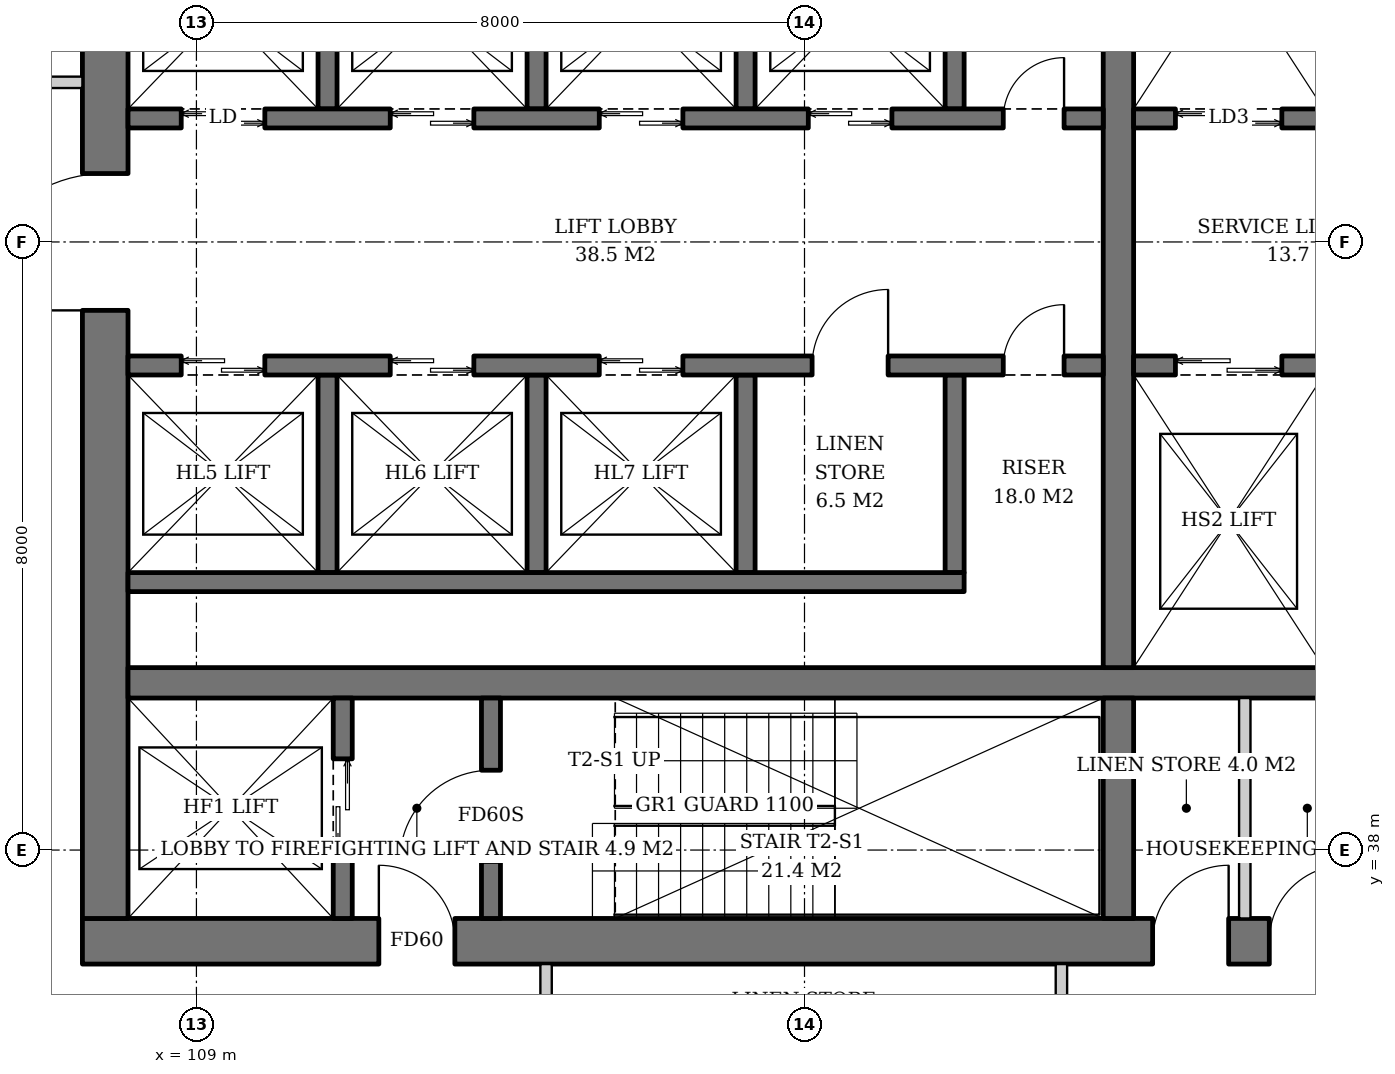
"""IFC4 building model, lengths in metres.
Left out: names, types, materials, properties, quantities, classifications, styles, units other than length and angle.
Written with IfcOpenShell. Run it as: python <this file> out.ifc"""

import sys

from ifc_helpers import new_model, si_unit, direction, frame, frame_2d, origin, place, context, subcontext, project, spatial, rectangle, extrude, element, fill, save


model = new_model("IFC4")
c1 = context("Model", 3, precision=1e-05, world=origin(), true_north=direction((0.0, 1.0)))
c2 = subcontext(c1, "Body", "Model", "MODEL_VIEW")
j1 = project(units=[si_unit("LENGTHUNIT", "METRE"), si_unit("PLANEANGLEUNIT", "RADIAN")], contexts=[c1])
p1 = place(None, origin())
s1 = spatial("IfcSite", under=j1, at=p1, CompositionType="ELEMENT")
p2 = place(p1, origin())
s2 = spatial("IfcBuilding", under=s1, at=p2, CompositionType="ELEMENT")
p3 = place(p2, frame((0.0, 0.0, 40.0)))
s3 = spatial("IfcBuildingStorey", under=s2, at=p3, CompositionType="ELEMENT", Elevation=40.0)
p4 = place(p3, frame((107.5, 36.8, 0.0), z_axis=(0.0, 0.0, 1.0), x_axis=(1.0, 0.0, 0.0)))
e1 = element("IfcWall", 1, at=p4, inside=s3, PredefinedType="SHEAR", context=c2, shape_type="SweptSolid", body=[
    extrude(rectangle(XDim=19.0, YDim=0.6, at=frame_2d((9.5, 0.0))), origin(), (0.0, 0.0, 1.0), 3.8),
])
p5 = place(p4, frame((3.9, 0.0, 0.0)))
e2 = element("IfcOpeningElement", 2, at=p5, cuts=e1, PredefinedType="OPENING", context=c2, shape_type="SweptSolid", body=[
    extrude(rectangle(XDim=1.0, YDim=2.1, at=frame_2d((0.5, 1.05))), frame((0.0, 0.31, 0.0), z_axis=(0.0, -1.0, 0.0), x_axis=(1.0, 0.0, 0.0)), (0.0, 0.0, 1.0), 0.62),
])
p6 = place(p4, frame((14.08, 0.0, 0.0)))
e3 = element("IfcOpeningElement", 3, at=p6, cuts=e1, PredefinedType="OPENING", context=c2, shape_type="SweptSolid", body=[
    extrude(rectangle(XDim=1.0, YDim=2.1, at=frame_2d((0.5, 1.05))), frame((0.0, 0.31, 0.0), z_axis=(0.0, -1.0, 0.0), x_axis=(1.0, 0.0, 0.0)), (0.0, 0.0, 1.0), 0.62),
])
p7 = place(p4, frame((15.615, 0.0, 0.0)))
e4 = element("IfcOpeningElement", 4, at=p7, cuts=e1, PredefinedType="OPENING", context=c2, shape_type="SweptSolid", body=[
    extrude(rectangle(XDim=1.0, YDim=2.1, at=frame_2d((0.5, 1.05))), frame((0.0, 0.31, 0.0), z_axis=(0.0, -1.0, 0.0), x_axis=(1.0, 0.0, 0.0)), (0.0, 0.0, 1.0), 0.62),
])
p8 = place(p4, frame((17.188, 0.0, 0.0)))
e5 = element("IfcOpeningElement", 5, at=p8, cuts=e1, PredefinedType="OPENING", context=c2, shape_type="SweptSolid", body=[
    extrude(rectangle(XDim=1.0, YDim=2.1, at=frame_2d((0.5, 1.05))), frame((0.0, 0.31, 0.0), z_axis=(0.0, -1.0, 0.0), x_axis=(1.0, 0.0, 0.0)), (0.0, 0.0, 1.0), 0.62),
])
p9 = place(p3, frame((107.8, 37.1, 0.0), z_axis=(0.0, 0.0, 1.0), x_axis=(0.0, 1.0, 0.0)))
e6 = element("IfcWall", 6, at=p9, inside=s3, PredefinedType="SHEAR", context=c2, shape_type="SweptSolid", body=[
    extrude(rectangle(XDim=17.8, YDim=0.6, at=frame_2d((8.9, 0.0))), origin(), (0.0, 0.0, 1.0), 3.8),
])
p10 = place(p9, frame((8.0, 0.0, 0.0)))
e7 = element("IfcOpeningElement", 7, at=p10, cuts=e6, PredefinedType="OPENING", context=c2, shape_type="SweptSolid", body=[
    extrude(rectangle(XDim=1.8, YDim=2.4, at=frame_2d((0.9, 1.2))), frame((0.0, 0.31, 0.0), z_axis=(0.0, -1.0, 0.0), x_axis=(1.0, 0.0, 0.0)), (0.0, 0.0, 1.0), 0.62),
])
p11 = place(p3, frame((108.1, 40.2, 0.0), z_axis=(0.0, 0.0, 1.0), x_axis=(1.0, 0.0, 0.0)))
e8 = element("IfcWall", 8, at=p11, inside=s3, PredefinedType="SHEAR", context=c2, shape_type="SweptSolid", body=[
    extrude(rectangle(XDim=17.8, YDim=0.4, at=frame_2d((8.9, 0.0))), origin(), (0.0, 0.0, 1.0), 3.8),
])
p12 = place(p3, frame((121.13, 37.1, 0.0), z_axis=(0.0, 0.0, 1.0), x_axis=(0.0, 1.0, 0.0)))
e9 = element("IfcWall", 9, at=p12, inside=s3, PredefinedType="SHEAR", context=c2, shape_type="SweptSolid", body=[
    extrude(rectangle(XDim=2.9, YDim=0.4, at=frame_2d((1.45, 0.0))), origin(), (0.0, 0.0, 1.0), 3.8),
])
p13 = place(p3, frame((121.13, 40.4, 0.0), z_axis=(0.0, 0.0, 1.0), x_axis=(0.0, 1.0, 0.0)))
e10 = element("IfcWall", 10, at=p13, inside=s3, PredefinedType="SHEAR", context=c2, shape_type="SweptSolid", body=[
    extrude(rectangle(XDim=11.2, YDim=0.4, at=frame_2d((5.6, 0.0))), origin(), (0.0, 0.0, 1.0), 3.8),
])
p14 = place(p3, frame((110.925, 37.1, 0.0), z_axis=(0.0, 0.0, 1.0), x_axis=(0.0, 1.0, 0.0)))
e11 = element("IfcWall", 11, at=p14, inside=s3, PredefinedType="SHEAR", context=c2, shape_type="SweptSolid", body=[
    extrude(rectangle(XDim=2.9, YDim=0.25, at=frame_2d((1.45, 0.0))), origin(), (0.0, 0.0, 1.0), 3.8),
])
p15 = place(p14, frame((0.8, 0.0, 0.0)))
e12 = element("IfcOpeningElement", 12, at=p15, cuts=e11, PredefinedType="OPENING", context=c2, shape_type="SweptSolid", body=[
    extrude(rectangle(XDim=1.3, YDim=2.2, at=frame_2d((0.65, 1.1))), frame((0.0, 0.135, 0.0), z_axis=(0.0, -1.0, 0.0), x_axis=(1.0, 0.0, 0.0)), (0.0, 0.0, 1.0), 0.27),
])
p16 = place(p3, frame((112.875, 37.1, 0.0), z_axis=(0.0, 0.0, 1.0), x_axis=(0.0, 1.0, 0.0)))
e13 = element("IfcWall", 13, at=p16, inside=s3, PredefinedType="SHEAR", context=c2, shape_type="SweptSolid", body=[
    extrude(rectangle(XDim=2.9, YDim=0.25, at=frame_2d((1.45, 0.0))), origin(), (0.0, 0.0, 1.0), 3.8),
])
p17 = place(p16, frame((0.75, 0.0, 0.0)))
e14 = element("IfcOpeningElement", 14, at=p17, cuts=e13, PredefinedType="OPENING", context=c2, shape_type="SweptSolid", body=[
    extrude(rectangle(XDim=1.2, YDim=2.1, at=frame_2d((0.6, 1.05))), frame((0.0, 0.135, 0.0), z_axis=(0.0, -1.0, 0.0), x_axis=(1.0, 0.0, 0.0)), (0.0, 0.0, 1.0), 0.27),
])
for number, where, z_axis, x_axis in (
    (15, (110.725, 47.75, 0.0), (0.0, 0.0, 1.0), (0.0, 1.0, 0.0)),
    (16, (113.475, 47.75, 0.0), (0.0, 0.0, 1.0), (0.0, 1.0, 0.0)),
    (17, (116.225, 47.75, 0.0), (0.0, 0.0, 1.0), (0.0, 1.0, 0.0)),
    (18, (118.975, 47.75, 0.0), (0.0, 0.0, 1.0), (0.0, 1.0, 0.0)),
):
    element("IfcWall", number, at=place(p3, frame(where, z_axis=z_axis, x_axis=x_axis)), inside=s3, PredefinedType="SHEAR", context=c2, shape_type="SweptSolid", body=[
        extrude(rectangle(XDim=2.6, YDim=0.25, at=frame_2d((1.3, 0.0))), origin(), (0.0, 0.0, 1.0), 3.8),
    ])
p18 = place(p3, frame((108.1, 47.625, 0.0), z_axis=(0.0, 0.0, 1.0), x_axis=(1.0, 0.0, 0.0)))
e19 = element("IfcWall", 19, at=p18, inside=s3, PredefinedType="SHEAR", context=c2, shape_type="SweptSolid", body=[
    extrude(rectangle(XDim=12.83, YDim=0.25, at=frame_2d((6.415, 0.0))), origin(), (0.0, 0.0, 1.0), 3.8),
])
p19 = place(p18, frame((0.7, 0.0, 0.0)))
e20 = element("IfcOpeningElement", 20, at=p19, cuts=e19, PredefinedType="OPENING", context=c2, shape_type="SweptSolid", body=[
    extrude(rectangle(XDim=1.1, YDim=2.2, at=frame_2d((0.55, 1.1))), frame((0.0, 0.135, 0.0), z_axis=(0.0, -1.0, 0.0), x_axis=(1.0, 0.0, 0.0)), (0.0, 0.0, 1.0), 0.27),
])
p20 = place(p18, frame((3.45, 0.0, 0.0)))
e21 = element("IfcOpeningElement", 21, at=p20, cuts=e19, PredefinedType="OPENING", context=c2, shape_type="SweptSolid", body=[
    extrude(rectangle(XDim=1.1, YDim=2.2, at=frame_2d((0.55, 1.1))), frame((0.0, 0.135, 0.0), z_axis=(0.0, -1.0, 0.0), x_axis=(1.0, 0.0, 0.0)), (0.0, 0.0, 1.0), 0.27),
])
p21 = place(p18, frame((6.2, 0.0, 0.0)))
e22 = element("IfcOpeningElement", 22, at=p21, cuts=e19, PredefinedType="OPENING", context=c2, shape_type="SweptSolid", body=[
    extrude(rectangle(XDim=1.1, YDim=2.2, at=frame_2d((0.55, 1.1))), frame((0.0, 0.135, 0.0), z_axis=(0.0, -1.0, 0.0), x_axis=(1.0, 0.0, 0.0)), (0.0, 0.0, 1.0), 0.27),
])
p22 = place(p18, frame((8.95, 0.0, 0.0)))
e23 = element("IfcOpeningElement", 23, at=p22, cuts=e19, PredefinedType="OPENING", context=c2, shape_type="SweptSolid", body=[
    extrude(rectangle(XDim=1.1, YDim=2.2, at=frame_2d((0.55, 1.1))), frame((0.0, 0.135, 0.0), z_axis=(0.0, -1.0, 0.0), x_axis=(1.0, 0.0, 0.0)), (0.0, 0.0, 1.0), 0.27),
])
p23 = place(p18, frame((11.515, 0.0, 0.0)))
e24 = element("IfcOpeningElement", 24, at=p23, cuts=e19, PredefinedType="OPENING", context=c2, shape_type="SweptSolid", body=[
    extrude(rectangle(XDim=0.8, YDim=2.0, at=frame_2d((0.4, 1.0))), frame((0.0, 0.135, 0.0), z_axis=(0.0, -1.0, 0.0), x_axis=(1.0, 0.0, 0.0)), (0.0, 0.0, 1.0), 0.27),
])
for number, where, z_axis, x_axis in (
    (25, (110.725, 44.25, 0.0), (0.0, 0.0, 1.0), (0.0, -1.0, 0.0)),
    (26, (113.475, 44.25, 0.0), (0.0, 0.0, 1.0), (0.0, -1.0, 0.0)),
    (27, (116.225, 44.25, 0.0), (0.0, 0.0, 1.0), (0.0, -1.0, 0.0)),
    (28, (118.975, 44.25, 0.0), (0.0, 0.0, 1.0), (0.0, -1.0, 0.0)),
):
    element("IfcWall", number, at=place(p3, frame(where, z_axis=z_axis, x_axis=x_axis)), inside=s3, PredefinedType="SHEAR", context=c2, shape_type="SweptSolid", body=[
        extrude(rectangle(XDim=2.6, YDim=0.25, at=frame_2d((1.3, 0.0))), origin(), (0.0, 0.0, 1.0), 3.8),
    ])
p24 = place(p3, frame((108.1, 41.525, 0.0), z_axis=(0.0, 0.0, 1.0), x_axis=(1.0, 0.0, 0.0)))
e29 = element("IfcWall", 29, at=p24, inside=s3, PredefinedType="SHEAR", context=c2, shape_type="SweptSolid", body=[
    extrude(rectangle(XDim=11.0, YDim=0.25, at=frame_2d((5.5, 0.0))), origin(), (0.0, 0.0, 1.0), 3.8),
])
p25 = place(p3, frame((108.1, 44.375, 0.0), z_axis=(0.0, 0.0, 1.0), x_axis=(1.0, 0.0, 0.0)))
e30 = element("IfcWall", 30, at=p25, inside=s3, PredefinedType="SHEAR", context=c2, shape_type="SweptSolid", body=[
    extrude(rectangle(XDim=12.83, YDim=0.25, at=frame_2d((6.415, 0.0))), origin(), (0.0, 0.0, 1.0), 3.8),
])
p26 = place(p25, frame((0.7, 0.0, 0.0)))
e31 = element("IfcOpeningElement", 31, at=p26, cuts=e30, PredefinedType="OPENING", context=c2, shape_type="SweptSolid", body=[
    extrude(rectangle(XDim=1.1, YDim=2.2, at=frame_2d((0.55, 1.1))), frame((0.0, 0.135, 0.0), z_axis=(0.0, -1.0, 0.0), x_axis=(1.0, 0.0, 0.0)), (0.0, 0.0, 1.0), 0.27),
])
p27 = place(p25, frame((3.45, 0.0, 0.0)))
e32 = element("IfcOpeningElement", 32, at=p27, cuts=e30, PredefinedType="OPENING", context=c2, shape_type="SweptSolid", body=[
    extrude(rectangle(XDim=1.1, YDim=2.2, at=frame_2d((0.55, 1.1))), frame((0.0, 0.135, 0.0), z_axis=(0.0, -1.0, 0.0), x_axis=(1.0, 0.0, 0.0)), (0.0, 0.0, 1.0), 0.27),
])
p28 = place(p25, frame((6.2, 0.0, 0.0)))
e33 = element("IfcOpeningElement", 33, at=p28, cuts=e30, PredefinedType="OPENING", context=c2, shape_type="SweptSolid", body=[
    extrude(rectangle(XDim=1.1, YDim=2.2, at=frame_2d((0.55, 1.1))), frame((0.0, 0.135, 0.0), z_axis=(0.0, -1.0, 0.0), x_axis=(1.0, 0.0, 0.0)), (0.0, 0.0, 1.0), 0.27),
])
p29 = place(p25, frame((9.0, 0.0, 0.0)))
e34 = element("IfcOpeningElement", 34, at=p29, cuts=e30, PredefinedType="OPENING", context=c2, shape_type="SweptSolid", body=[
    extrude(rectangle(XDim=1.0, YDim=2.1, at=frame_2d((0.5, 1.05))), frame((0.0, 0.135, 0.0), z_axis=(0.0, -1.0, 0.0), x_axis=(1.0, 0.0, 0.0)), (0.0, 0.0, 1.0), 0.27),
])
p30 = place(p25, frame((11.515, 0.0, 0.0)))
e35 = element("IfcOpeningElement", 35, at=p30, cuts=e30, PredefinedType="OPENING", context=c2, shape_type="SweptSolid", body=[
    extrude(rectangle(XDim=0.8, YDim=2.0, at=frame_2d((0.4, 1.0))), frame((0.0, 0.135, 0.0), z_axis=(0.0, -1.0, 0.0), x_axis=(1.0, 0.0, 0.0)), (0.0, 0.0, 1.0), 0.27),
])
p31 = place(p3, frame((121.33, 47.625, 0.0), z_axis=(0.0, 0.0, 1.0), x_axis=(1.0, 0.0, 0.0)))
e36 = element("IfcWall", 36, at=p31, inside=s3, PredefinedType="SHEAR", context=c2, shape_type="SweptSolid", body=[
    extrude(rectangle(XDim=4.57, YDim=0.25, at=frame_2d((2.285, 0.0))), origin(), (0.0, 0.0, 1.0), 3.8),
])
p32 = place(p31, frame((0.55, 0.0, 0.0)))
e37 = element("IfcOpeningElement", 37, at=p32, cuts=e36, PredefinedType="OPENING", context=c2, shape_type="SweptSolid", body=[
    extrude(rectangle(XDim=1.4, YDim=2.4, at=frame_2d((0.7, 1.2))), frame((0.0, 0.135, 0.0), z_axis=(0.0, -1.0, 0.0), x_axis=(1.0, 0.0, 0.0)), (0.0, 0.0, 1.0), 0.27),
])
p33 = place(p31, frame((3.26, 0.0, 0.0)))
e38 = element("IfcOpeningElement", 38, at=p33, cuts=e36, PredefinedType="OPENING", context=c2, shape_type="SweptSolid", body=[
    extrude(rectangle(XDim=0.8, YDim=2.0, at=frame_2d((0.4, 1.0))), frame((0.0, 0.135, 0.0), z_axis=(0.0, -1.0, 0.0), x_axis=(1.0, 0.0, 0.0)), (0.0, 0.0, 1.0), 0.27),
])
p34 = place(p3, frame((121.33, 44.375, 0.0), z_axis=(0.0, 0.0, 1.0), x_axis=(1.0, 0.0, 0.0)))
e39 = element("IfcWall", 39, at=p34, inside=s3, PredefinedType="SHEAR", context=c2, shape_type="SweptSolid", body=[
    extrude(rectangle(XDim=4.57, YDim=0.25, at=frame_2d((2.285, 0.0))), origin(), (0.0, 0.0, 1.0), 3.8),
])
p35 = place(p34, frame((0.55, 0.0, 0.0)))
e40 = element("IfcOpeningElement", 40, at=p35, cuts=e39, PredefinedType="OPENING", context=c2, shape_type="SweptSolid", body=[
    extrude(rectangle(XDim=1.4, YDim=2.4, at=frame_2d((0.7, 1.2))), frame((0.0, 0.135, 0.0), z_axis=(0.0, -1.0, 0.0), x_axis=(1.0, 0.0, 0.0)), (0.0, 0.0, 1.0), 0.27),
])
p36 = place(p34, frame((3.26, 0.0, 0.0)))
e41 = element("IfcOpeningElement", 41, at=p36, cuts=e39, PredefinedType="OPENING", context=c2, shape_type="SweptSolid", body=[
    extrude(rectangle(XDim=0.8, YDim=2.0, at=frame_2d((0.4, 1.0))), frame((0.0, 0.135, 0.0), z_axis=(0.0, -1.0, 0.0), x_axis=(1.0, 0.0, 0.0)), (0.0, 0.0, 1.0), 0.27),
])
p37 = place(p3, frame((122.792, 37.1, 0.0), z_axis=(0.0, 0.0, 1.0), x_axis=(0.0, 1.0, 0.0)))
e42 = element("IfcWall", 42, at=p37, inside=s3, PredefinedType="SOLIDWALL", context=c2, shape_type="SweptSolid", body=[
    extrude(rectangle(XDim=2.9, YDim=0.15, at=frame_2d((1.45, 0.0))), origin(), (0.0, 0.0, 1.0), 3.6),
])
for number, where, z_axis, x_axis in (
    (43, (107.5, 48.1, 0.0), (0.0, 0.0, 1.0), (-1.0, 0.0, 0.0)),
    (44, (113.6, 36.5, 0.0), (0.0, 0.0, 1.0), (0.0, -1.0, 0.0)),
    (45, (120.38, 36.5, 0.0), (0.0, 0.0, 1.0), (0.0, -1.0, 0.0)),
):
    element("IfcWall", number, at=place(p3, frame(where, z_axis=z_axis, x_axis=x_axis)), inside=s3, PredefinedType="PARTITIONING", context=c2, shape_type="SweptSolid", body=[
        extrude(rectangle(XDim=1.875, YDim=0.15, at=frame_2d((0.938, 0.0))), origin(), (0.0, 0.0, 1.0), 3.6),
    ])
p38 = place(p15, origin())
e46 = element("IfcDoor", 46, at=p38, inside=s3, OperationType="DOUBLE_DOOR_SLIDING", PredefinedType="DOOR", context=c2, shape_type="SweptSolid", body=[
    extrude(rectangle(XDim=1.3, YDim=2.2, at=frame_2d((0.65, 1.1))), frame((0.0, 0.025, 0.0), z_axis=(0.0, -1.0, 0.0), x_axis=(1.0, 0.0, 0.0)), (0.0, 0.0, 1.0), 0.05),
])
fill(e12, e46)
p39 = place(p17, origin())
e47 = element("IfcDoor", 47, at=p39, inside=s3, OperationType="SINGLE_SWING_LEFT", PredefinedType="DOOR", context=c2, shape_type="SweptSolid", body=[
    extrude(rectangle(XDim=1.2, YDim=2.1, at=frame_2d((0.6, 1.05))), frame((0.0, 0.025, 0.0), z_axis=(0.0, -1.0, 0.0), x_axis=(1.0, 0.0, 0.0)), (0.0, 0.0, 1.0), 0.05),
])
fill(e14, e47)
p40 = place(p19, origin())
e48 = element("IfcDoor", 48, at=p40, inside=s3, OperationType="DOUBLE_DOOR_SLIDING", PredefinedType="DOOR", context=c2, shape_type="SweptSolid", body=[
    extrude(rectangle(XDim=1.1, YDim=2.2, at=frame_2d((0.55, 1.1))), frame((0.0, 0.025, 0.0), z_axis=(0.0, -1.0, 0.0), x_axis=(1.0, 0.0, 0.0)), (0.0, 0.0, 1.0), 0.05),
])
fill(e20, e48)
p41 = place(p20, origin())
e49 = element("IfcDoor", 49, at=p41, inside=s3, OperationType="DOUBLE_DOOR_SLIDING", PredefinedType="DOOR", context=c2, shape_type="SweptSolid", body=[
    extrude(rectangle(XDim=1.1, YDim=2.2, at=frame_2d((0.55, 1.1))), frame((0.0, 0.025, 0.0), z_axis=(0.0, -1.0, 0.0), x_axis=(1.0, 0.0, 0.0)), (0.0, 0.0, 1.0), 0.05),
])
fill(e21, e49)
p42 = place(p21, origin())
e50 = element("IfcDoor", 50, at=p42, inside=s3, OperationType="DOUBLE_DOOR_SLIDING", PredefinedType="DOOR", context=c2, shape_type="SweptSolid", body=[
    extrude(rectangle(XDim=1.1, YDim=2.2, at=frame_2d((0.55, 1.1))), frame((0.0, 0.025, 0.0), z_axis=(0.0, -1.0, 0.0), x_axis=(1.0, 0.0, 0.0)), (0.0, 0.0, 1.0), 0.05),
])
fill(e22, e50)
p43 = place(p22, origin())
e51 = element("IfcDoor", 51, at=p43, inside=s3, OperationType="DOUBLE_DOOR_SLIDING", PredefinedType="DOOR", context=c2, shape_type="SweptSolid", body=[
    extrude(rectangle(XDim=1.1, YDim=2.2, at=frame_2d((0.55, 1.1))), frame((0.0, 0.025, 0.0), z_axis=(0.0, -1.0, 0.0), x_axis=(1.0, 0.0, 0.0)), (0.0, 0.0, 1.0), 0.05),
])
fill(e23, e51)
p44 = place(p23, origin())
e52 = element("IfcDoor", 52, at=p44, inside=s3, OperationType="SINGLE_SWING_RIGHT", PredefinedType="DOOR", context=c2, shape_type="SweptSolid", body=[
    extrude(rectangle(XDim=0.8, YDim=2.0, at=frame_2d((0.4, 1.0))), frame((0.0, 0.025, 0.0), z_axis=(0.0, -1.0, 0.0), x_axis=(1.0, 0.0, 0.0)), (0.0, 0.0, 1.0), 0.05),
])
fill(e24, e52)
p45 = place(p26, origin())
e53 = element("IfcDoor", 53, at=p45, inside=s3, OperationType="DOUBLE_DOOR_SLIDING", PredefinedType="DOOR", context=c2, shape_type="SweptSolid", body=[
    extrude(rectangle(XDim=1.1, YDim=2.2, at=frame_2d((0.55, 1.1))), frame((0.0, 0.025, 0.0), z_axis=(0.0, -1.0, 0.0), x_axis=(1.0, 0.0, 0.0)), (0.0, 0.0, 1.0), 0.05),
])
fill(e31, e53)
p46 = place(p27, origin())
e54 = element("IfcDoor", 54, at=p46, inside=s3, OperationType="DOUBLE_DOOR_SLIDING", PredefinedType="DOOR", context=c2, shape_type="SweptSolid", body=[
    extrude(rectangle(XDim=1.1, YDim=2.2, at=frame_2d((0.55, 1.1))), frame((0.0, 0.025, 0.0), z_axis=(0.0, -1.0, 0.0), x_axis=(1.0, 0.0, 0.0)), (0.0, 0.0, 1.0), 0.05),
])
fill(e32, e54)
p47 = place(p28, origin())
e55 = element("IfcDoor", 55, at=p47, inside=s3, OperationType="DOUBLE_DOOR_SLIDING", PredefinedType="DOOR", context=c2, shape_type="SweptSolid", body=[
    extrude(rectangle(XDim=1.1, YDim=2.2, at=frame_2d((0.55, 1.1))), frame((0.0, 0.025, 0.0), z_axis=(0.0, -1.0, 0.0), x_axis=(1.0, 0.0, 0.0)), (0.0, 0.0, 1.0), 0.05),
])
fill(e33, e55)
p48 = place(p29, origin())
e56 = element("IfcDoor", 56, at=p48, inside=s3, OperationType="SINGLE_SWING_RIGHT", PredefinedType="DOOR", context=c2, shape_type="SweptSolid", body=[
    extrude(rectangle(XDim=1.0, YDim=2.1, at=frame_2d((0.5, 1.05))), frame((0.0, 0.025, 0.0), z_axis=(0.0, -1.0, 0.0), x_axis=(1.0, 0.0, 0.0)), (0.0, 0.0, 1.0), 0.05),
])
fill(e34, e56)
p49 = place(p30, origin())
e57 = element("IfcDoor", 57, at=p49, inside=s3, OperationType="SINGLE_SWING_RIGHT", PredefinedType="DOOR", context=c2, shape_type="SweptSolid", body=[
    extrude(rectangle(XDim=0.8, YDim=2.0, at=frame_2d((0.4, 1.0))), frame((0.0, 0.025, 0.0), z_axis=(0.0, -1.0, 0.0), x_axis=(1.0, 0.0, 0.0)), (0.0, 0.0, 1.0), 0.05),
])
fill(e35, e57)
p50 = place(p32, origin())
e58 = element("IfcDoor", 58, at=p50, inside=s3, OperationType="DOUBLE_DOOR_SLIDING", PredefinedType="DOOR", context=c2, shape_type="SweptSolid", body=[
    extrude(rectangle(XDim=1.4, YDim=2.4, at=frame_2d((0.7, 1.2))), frame((0.0, 0.025, 0.0), z_axis=(0.0, -1.0, 0.0), x_axis=(1.0, 0.0, 0.0)), (0.0, 0.0, 1.0), 0.05),
])
fill(e37, e58)
p51 = place(p35, origin())
e59 = element("IfcDoor", 59, at=p51, inside=s3, OperationType="DOUBLE_DOOR_SLIDING", PredefinedType="DOOR", context=c2, shape_type="SweptSolid", body=[
    extrude(rectangle(XDim=1.4, YDim=2.4, at=frame_2d((0.7, 1.2))), frame((0.0, 0.025, 0.0), z_axis=(0.0, -1.0, 0.0), x_axis=(1.0, 0.0, 0.0)), (0.0, 0.0, 1.0), 0.05),
])
fill(e40, e59)
p52 = place(p5, origin())
e60 = element("IfcDoor", 60, at=p52, inside=s3, OperationType="SINGLE_SWING_LEFT", PredefinedType="DOOR", context=c2, shape_type="SweptSolid", body=[
    extrude(rectangle(XDim=1.0, YDim=2.1, at=frame_2d((0.5, 1.05))), frame((0.0, 0.025, 0.0), z_axis=(0.0, -1.0, 0.0), x_axis=(1.0, 0.0, 0.0)), (0.0, 0.0, 1.0), 0.05),
])
fill(e2, e60)
p53 = place(p10, origin())
e61 = element("IfcDoor", 61, at=p53, inside=s3, OperationType="DOUBLE_DOOR_SINGLE_SWING", PredefinedType="DOOR", context=c2, shape_type="SweptSolid", body=[
    extrude(rectangle(XDim=1.8, YDim=2.4, at=frame_2d((0.9, 1.2))), frame((0.0, 0.025, 0.0), z_axis=(0.0, -1.0, 0.0), x_axis=(1.0, 0.0, 0.0)), (0.0, 0.0, 1.0), 0.05),
])
fill(e7, e61)
p54 = place(p6, origin())
e62 = element("IfcDoor", 62, at=p54, inside=s3, OperationType="SINGLE_SWING_RIGHT", PredefinedType="DOOR", context=c2, shape_type="SweptSolid", body=[
    extrude(rectangle(XDim=1.0, YDim=2.1, at=frame_2d((0.5, 1.05))), frame((0.0, 0.29, 0.0), z_axis=(0.0, -1.0, 0.0), x_axis=(1.0, 0.0, 0.0)), (0.0, 0.0, 1.0), 0.05),
])
fill(e3, e62)
p55 = place(p7, origin())
e63 = element("IfcDoor", 63, at=p55, inside=s3, OperationType="SINGLE_SWING_RIGHT", PredefinedType="DOOR", context=c2, shape_type="SweptSolid", body=[
    extrude(rectangle(XDim=1.0, YDim=2.1, at=frame_2d((0.5, 1.05))), frame((0.0, 0.29, 0.0), z_axis=(0.0, -1.0, 0.0), x_axis=(1.0, 0.0, 0.0)), (0.0, 0.0, 1.0), 0.05),
])
fill(e4, e63)
save(model, sys.argv[1])
